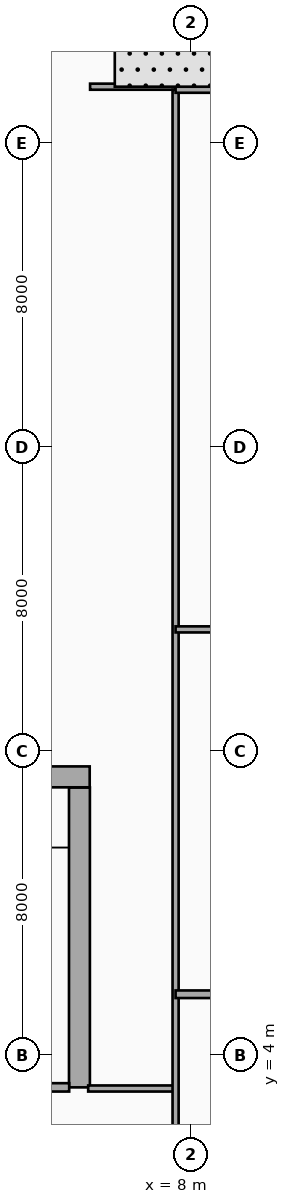
"""IFC4 building model, lengths in metres.
Left out: names, types, materials, properties, quantities, classifications, styles, units other than length and angle.
Written with IfcOpenShell. Run it as: python <this file> out.ifc"""

import sys

from ifc_helpers import new_model, si_unit, direction, frame, frame_2d, origin, place, context, subcontext, project, spatial, rectangle, extrude, element, fill, save


model = new_model("IFC4")
c1 = context("Model", 3, precision=1e-05, world=origin(), true_north=direction((0.0, 1.0)))
c2 = subcontext(c1, "Body", "Model", "MODEL_VIEW")
j1 = project(units=[si_unit("LENGTHUNIT", "METRE"), si_unit("PLANEANGLEUNIT", "RADIAN")], contexts=[c1])
p1 = place(None, origin())
s1 = spatial("IfcSite", under=j1, at=p1, CompositionType="ELEMENT")
p2 = place(p1, origin())
s2 = spatial("IfcBuilding", under=s1, at=p2, CompositionType="ELEMENT")
p3 = place(p2, origin())
s3 = spatial("IfcBuildingStorey", under=s2, at=p3, CompositionType="ELEMENT", Elevation=0.0)
p4 = place(p3, frame((5.07, 3.15, 0.0), z_axis=(0.0, 0.0, 1.0), x_axis=(0.0, 1.0, 0.0)))
e1 = element("IfcWall", 1, at=p4, inside=s3, PredefinedType="SHEAR", context=c2, shape_type="SweptSolid", body=[
    extrude(rectangle(XDim=7.89, YDim=0.55, at=frame_2d((3.945, 0.0))), origin(), (0.0, 0.0, 1.0), 5.94),
])
p5 = place(p3, frame((1.1, 11.32, 0.0), z_axis=(0.0, 0.0, 1.0), x_axis=(1.0, 0.0, 0.0)))
e2 = element("IfcWall", 2, at=p5, inside=s3, PredefinedType="SHEAR", context=c2, shape_type="SweptSolid", body=[
    extrude(rectangle(XDim=4.24, YDim=0.55, at=frame_2d((2.12, 0.0))), origin(), (0.0, 0.0, 1.0), 5.94),
])
p6 = place(p3, frame((1.65, 3.15, 0.0), z_axis=(0.0, 0.0, 1.0), x_axis=(1.0, 0.0, 0.0)))
e3 = element("IfcWall", 3, at=p6, inside=s3, PredefinedType="PARTITIONING", context=c2, shape_type="SweptSolid", body=[
    extrude(rectangle(XDim=3.15, YDim=0.22, at=frame_2d((1.575, 0.0))), origin(), (0.0, 0.0, 1.0), 5.62),
])
p7 = place(p6, frame((2.1, 0.0, 0.0), z_axis=(0.0, 0.0, 1.0), x_axis=(-1.0, 0.0, 0.0)))
e4 = element("IfcOpeningElement", 4, at=p7, cuts=e3, PredefinedType="OPENING", context=c2, shape_type="SweptSolid", body=[
    extrude(rectangle(XDim=1.05, YDim=2.15, at=frame_2d((0.525, 1.075))), frame((0.0, 0.12, 0.0), z_axis=(0.0, -1.0, 0.0), x_axis=(1.0, 0.0, 0.0)), (0.0, 0.0, 1.0), 0.24),
])
p8 = place(p3, frame((5.3, 3.12, 0.0), z_axis=(0.0, 0.0, 1.0), x_axis=(1.0, 0.0, 0.0)))
e5 = element("IfcWall", 5, at=p8, inside=s3, PredefinedType="PARTITIONING", context=c2, shape_type="SweptSolid", body=[
    extrude(rectangle(XDim=2.3, YDim=0.16, at=frame_2d((1.15, 0.0))), origin(), (0.0, 0.0, 1.0), 5.62),
])
p9 = place(p8, frame((0.6, 0.0, 0.0)))
e6 = element("IfcOpeningElement", 6, at=p9, cuts=e5, PredefinedType="OPENING", context=c2, shape_type="SweptSolid", body=[
    extrude(rectangle(XDim=1.1, YDim=2.15, at=frame_2d((0.55, 1.075))), frame((0.0, 0.09, 0.0), z_axis=(0.0, -1.0, 0.0), x_axis=(1.0, 0.0, 0.0)), (0.0, 0.0, 1.0), 0.18),
])
p10 = place(p3, frame((5.35, 29.48, 0.0), z_axis=(0.0, 0.0, 1.0), x_axis=(1.0, 0.0, 0.0)))
e7 = element("IfcWall", 7, at=p10, inside=s3, PredefinedType="PARTITIONING", context=c2, shape_type="SweptSolid", body=[
    extrude(rectangle(XDim=2.25, YDim=0.16, at=frame_2d((1.125, 0.0))), origin(), (0.0, 0.0, 1.0), 5.275),
])
p11 = place(p10, frame((0.5, 0.0, 0.0)))
e8 = element("IfcOpeningElement", 8, at=p11, cuts=e7, PredefinedType="OPENING", context=c2, shape_type="SweptSolid", body=[
    extrude(rectangle(XDim=1.1, YDim=2.15, at=frame_2d((0.55, 1.075))), frame((0.0, 0.09, 0.0), z_axis=(0.0, -1.0, 0.0), x_axis=(1.0, 0.0, 0.0)), (0.0, 0.0, 1.0), 0.18),
])
p12 = place(p3, frame((7.6, -1.64, 0.0), z_axis=(0.0, 0.0, 1.0), x_axis=(0.0, 1.0, 0.0)))
e9 = element("IfcWall", 9, at=p12, inside=s3, PredefinedType="PARTITIONING", context=c2, shape_type="SweptSolid", body=[
    extrude(rectangle(XDim=31.04, YDim=0.16, at=frame_2d((15.52, 0.0))), origin(), (0.0, 0.0, 1.0), 5.62),
])
p13 = place(p12, frame((1.8, 0.0, 0.0)))
e10 = element("IfcOpeningElement", 10, at=p13, cuts=e9, PredefinedType="OPENING", context=c2, shape_type="SweptSolid", body=[
    extrude(rectangle(XDim=1.1, YDim=2.15, at=frame_2d((0.55, 1.075))), frame((0.0, 0.09, 0.0), z_axis=(0.0, -1.0, 0.0), x_axis=(1.0, 0.0, 0.0)), (0.0, 0.0, 1.0), 0.18),
])
p14 = place(p3, frame((7.6, 5.6, 0.0), z_axis=(0.0, 0.0, 1.0), x_axis=(1.0, 0.0, 0.0)))
e11 = element("IfcWall", 11, at=p14, inside=s3, PredefinedType="PARTITIONING", context=c2, shape_type="SweptSolid", body=[
    extrude(rectangle(XDim=5.9, YDim=0.2, at=frame_2d((2.95, 0.0))), origin(), (0.0, 0.0, 1.0), 5.62),
])
p15 = place(p3, frame((7.6, 29.4, 0.0), z_axis=(0.0, 0.0, 1.0), x_axis=(1.0, 0.0, 0.0)))
e12 = element("IfcWall", 12, at=p15, inside=s3, PredefinedType="PARTITIONING", context=c2, shape_type="SweptSolid", body=[
    extrude(rectangle(XDim=43.75, YDim=0.16, at=frame_2d((21.875, 0.0))), origin(), (0.0, 0.0, 1.0), 5.275),
])
p16 = place(p15, frame((3.5, 0.0, 0.0)))
e13 = element("IfcOpeningElement", 13, at=p16, cuts=e12, PredefinedType="OPENING", context=c2, shape_type="SweptSolid", body=[
    extrude(rectangle(XDim=1.8, YDim=2.3, at=frame_2d((0.9, 1.15))), frame((0.0, 0.09, 0.0), z_axis=(0.0, -1.0, 0.0), x_axis=(1.0, 0.0, 0.0)), (0.0, 0.0, 1.0), 0.18),
])
p17 = place(p15, frame((18.0, 0.0, 0.0)))
e14 = element("IfcOpeningElement", 14, at=p17, cuts=e12, PredefinedType="OPENING", context=c2, shape_type="SweptSolid", body=[
    extrude(rectangle(XDim=1.8, YDim=2.3, at=frame_2d((0.9, 1.15))), frame((0.0, 0.09, 0.0), z_axis=(0.0, -1.0, 0.0), x_axis=(1.0, 0.0, 0.0)), (0.0, 0.0, 1.0), 0.18),
])
p18 = place(p15, frame((29.5, 0.0, 0.0)))
e15 = element("IfcOpeningElement", 15, at=p18, cuts=e12, PredefinedType="OPENING", context=c2, shape_type="SweptSolid", body=[
    extrude(rectangle(XDim=0.95, YDim=2.15, at=frame_2d((0.475, 1.075))), frame((0.0, 0.09, 0.0), z_axis=(0.0, -1.0, 0.0), x_axis=(1.0, 0.0, 0.0)), (0.0, 0.0, 1.0), 0.18),
])
p19 = place(p15, frame((35.5, 0.0, 0.0)))
e16 = element("IfcOpeningElement", 16, at=p19, cuts=e12, PredefinedType="OPENING", context=c2, shape_type="SweptSolid", body=[
    extrude(rectangle(XDim=1.8, YDim=2.3, at=frame_2d((0.9, 1.15))), frame((0.0, 0.09, 0.0), z_axis=(0.0, -1.0, 0.0), x_axis=(1.0, 0.0, 0.0)), (0.0, 0.0, 1.0), 0.18),
])
p20 = place(p3, frame((7.6, 15.2, 0.0), z_axis=(0.0, 0.0, 1.0), x_axis=(1.0, 0.0, 0.0)))
e17 = element("IfcWall", 17, at=p20, inside=s3, PredefinedType="PARTITIONING", context=c2, shape_type="SweptSolid", body=[
    extrude(rectangle(XDim=23.6, YDim=0.16, at=frame_2d((11.8, 0.0))), origin(), (0.0, 0.0, 1.0), 4.805),
])
p21 = place(p20, frame((6.0, 0.0, 0.0)))
e18 = element("IfcOpeningElement", 18, at=p21, cuts=e17, PredefinedType="OPENING", context=c2, shape_type="SweptSolid", body=[
    extrude(rectangle(XDim=0.95, YDim=2.15, at=frame_2d((0.475, 1.075))), frame((0.0, 0.09, 0.0), z_axis=(0.0, -1.0, 0.0), x_axis=(1.0, 0.0, 0.0)), (0.0, 0.0, 1.0), 0.18),
])
p22 = place(p20, frame((18.5, 0.0, 0.0)))
e19 = element("IfcOpeningElement", 19, at=p22, cuts=e17, PredefinedType="OPENING", context=c2, shape_type="SweptSolid", body=[
    extrude(rectangle(XDim=1.8, YDim=2.3, at=frame_2d((0.9, 1.15))), frame((0.0, 0.09, 0.0), z_axis=(0.0, -1.0, 0.0), x_axis=(1.0, 0.0, 0.0)), (0.0, 0.0, 1.0), 0.18),
])
p23 = place(p9, origin())
e20 = element("IfcDoor", 20, at=p23, inside=s3, OperationType="SINGLE_SWING_LEFT", PredefinedType="DOOR", context=c2, shape_type="SweptSolid", body=[
    extrude(rectangle(XDim=1.1, YDim=2.15, at=frame_2d((0.55, 1.075))), frame((0.0, 0.025, 0.0), z_axis=(0.0, -1.0, 0.0), x_axis=(1.0, 0.0, 0.0)), (0.0, 0.0, 1.0), 0.05),
])
fill(e6, e20)
p24 = place(p11, origin())
e21 = element("IfcDoor", 21, at=p24, inside=s3, OperationType="SINGLE_SWING_RIGHT", PredefinedType="DOOR", context=c2, shape_type="SweptSolid", body=[
    extrude(rectangle(XDim=1.1, YDim=2.15, at=frame_2d((0.55, 1.075))), frame((0.0, 0.025, 0.0), z_axis=(0.0, -1.0, 0.0), x_axis=(1.0, 0.0, 0.0)), (0.0, 0.0, 1.0), 0.05),
])
fill(e8, e21)
save(model, sys.argv[1])
